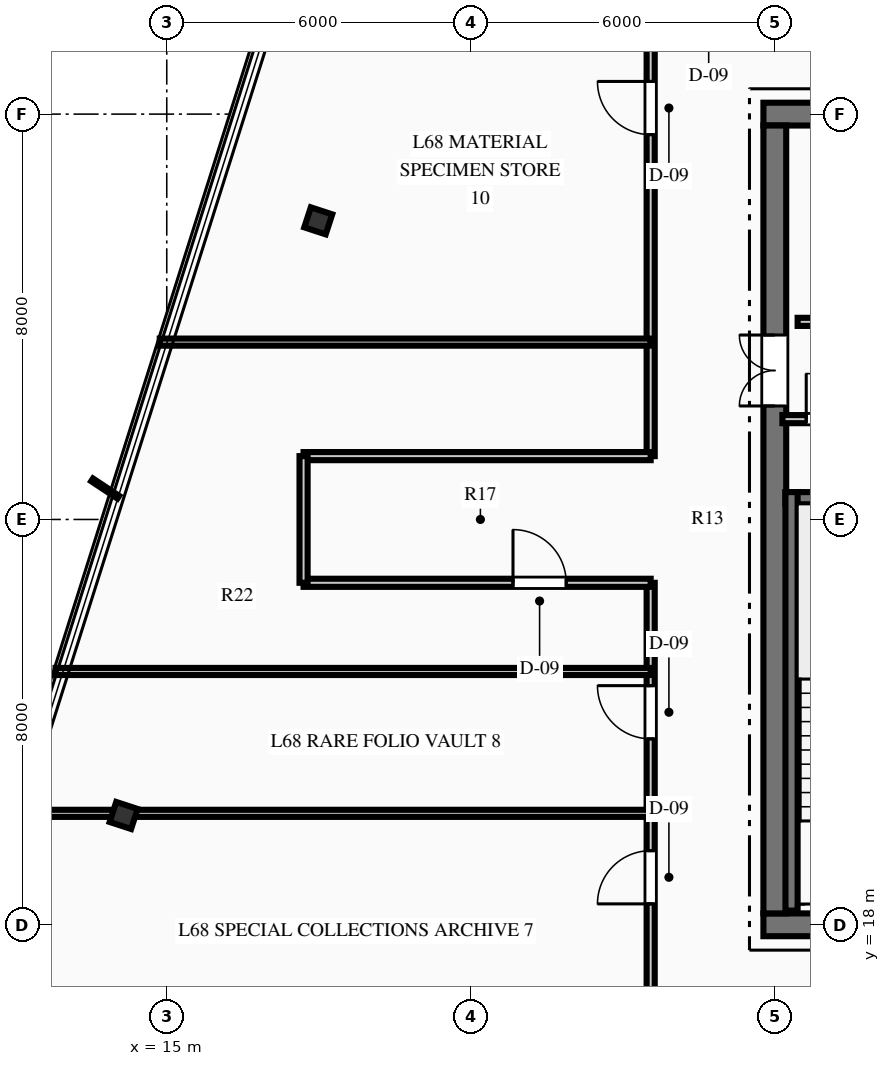
"""IFC4 building model, lengths in metres.
Left out: names, types, materials, properties, quantities, classifications, styles, units other than length and angle.
Written with IfcOpenShell. Run it as: python <this file> out.ifc"""

import sys

from ifc_helpers import new_model, si_unit, direction, frame, frame_2d, origin, origin_2d, place, context, subcontext, project, spatial, rectangle, i_section, extrude, element, fill, save


model = new_model("IFC4")
c1 = context("Model", 3, precision=1e-05, world=origin(), true_north=direction((0.0, 1.0)))
c2 = subcontext(c1, "Body", "Model", "MODEL_VIEW")
j1 = project(units=[si_unit("LENGTHUNIT", "METRE"), si_unit("PLANEANGLEUNIT", "RADIAN")], contexts=[c1])
p1 = place(None, origin())
s1 = spatial("IfcSite", under=j1, at=p1, CompositionType="ELEMENT")
p2 = place(p1, origin())
s2 = spatial("IfcBuilding", under=s1, at=p2, CompositionType="ELEMENT")
p3 = place(p2, frame((0.0, 0.0, 271.2)))
s3 = spatial("IfcBuildingStorey", under=s2, at=p3, CompositionType="ELEMENT", Elevation=271.2)
p4 = place(p3, frame((26.775, 18.0, 0.0), z_axis=(0.0, 0.0, 1.0), x_axis=(1.0, 0.0, 0.0)))
e1 = element("IfcWall", 1, at=p4, inside=s3, PredefinedType="SHEAR", context=c2, shape_type="SweptSolid", body=[
    extrude(rectangle(XDim=18.45, YDim=0.45, at=frame_2d((9.225, 0.0))), origin(), (0.0, 0.0, 1.0), 3.75),
])
p5 = place(p4, frame((7.325, 0.0, 0.0)))
e2 = element("IfcOpeningElement", 2, at=p5, cuts=e1, PredefinedType="OPENING", context=c2, shape_type="SweptSolid", body=[
    extrude(rectangle(XDim=1.1, YDim=2.15, at=frame_2d((0.55, 1.075))), frame((0.0, 0.235, 0.0), z_axis=(0.0, -1.0, 0.0), x_axis=(1.0, 0.0, 0.0)), (0.0, 0.0, 1.0), 0.47),
])
p6 = place(p4, frame((10.025, 0.0, 0.0)))
e3 = element("IfcOpeningElement", 3, at=p6, cuts=e1, PredefinedType="OPENING", context=c2, shape_type="SweptSolid", body=[
    extrude(rectangle(XDim=1.1, YDim=2.15, at=frame_2d((0.55, 1.075))), frame((0.0, 0.235, 0.0), z_axis=(0.0, -1.0, 0.0), x_axis=(1.0, 0.0, 0.0)), (0.0, 0.0, 1.0), 0.47),
])
p7 = place(p3, frame((26.775, 34.0, 0.0), z_axis=(0.0, 0.0, 1.0), x_axis=(1.0, 0.0, 0.0)))
e4 = element("IfcWall", 4, at=p7, inside=s3, PredefinedType="SHEAR", context=c2, shape_type="SweptSolid", body=[
    extrude(rectangle(XDim=18.45, YDim=0.45, at=frame_2d((9.225, 0.0))), origin(), (0.0, 0.0, 1.0), 3.75),
])
p8 = place(p3, frame((27.0, 18.225, 0.0), z_axis=(0.0, 0.0, 1.0), x_axis=(0.0, 1.0, 0.0)))
e5 = element("IfcWall", 5, at=p8, inside=s3, PredefinedType="SHEAR", context=c2, shape_type="SweptSolid", body=[
    extrude(rectangle(XDim=15.55, YDim=0.45, at=frame_2d((7.775, 0.0))), origin(), (0.0, 0.0, 1.0), 3.75),
])
p9 = place(p8, frame((10.015, 0.0, 0.0)))
e6 = element("IfcOpeningElement", 6, at=p9, cuts=e5, PredefinedType="OPENING", context=c2, shape_type="SweptSolid", body=[
    extrude(rectangle(XDim=1.4, YDim=2.2, at=frame_2d((0.7, 1.1))), frame((0.0, 0.235, 0.0), z_axis=(0.0, -1.0, 0.0), x_axis=(1.0, 0.0, 0.0)), (0.0, 0.0, 1.0), 0.47),
])
p10 = place(p3, frame((27.21, 26.42, 0.0), z_axis=(0.0, 0.0, 1.0), x_axis=(1.0, 0.0, 0.0)))
e7 = element("IfcWall", 7, at=p10, inside=s3, PredefinedType="SHEAR", context=c2, shape_type="SweptSolid", body=[
    extrude(rectangle(XDim=3.98, YDim=0.24, at=frame_2d((1.99, 0.0))), origin(), (0.0, 0.0, 1.0), 3.75),
])
p11 = place(p3, frame((27.33, 18.28, 0.0), z_axis=(0.0, 0.0, 1.0), x_axis=(0.0, 1.0, 0.0)))
e8 = element("IfcWall", 8, at=p11, inside=s3, PredefinedType="SHEAR", context=c2, shape_type="SweptSolid", body=[
    extrude(rectangle(XDim=8.26, YDim=0.24, at=frame_2d((4.13, 0.0))), origin(), (0.0, 0.0, 1.0), 3.75),
])
for number, where, z_axis, x_axis in (
    (9, (17.99, 31.894, 0.0), (0.0, 0.0, 1.0), (0.311, 0.95, 0.0)),
    (10, (14.149, 20.158, 0.0), (0.0, 0.0, 1.0), (0.311, 0.95, 0.0)),
):
    element("IfcColumn", number, at=place(p3, frame(where, z_axis=z_axis, x_axis=x_axis)), inside=s3, PredefinedType="COLUMN", context=c2, shape_type="SweptSolid", body=[
        extrude(i_section(OverallWidth=0.416, OverallDepth=0.445, WebThickness=0.039, FlangeThickness=0.063, at=origin_2d()), origin(), (0.0, 0.0, 1.0), 3.75),
    ])
p12 = place(p3, frame((27.15, 27.98, 0.0), z_axis=(0.0, 0.0, 1.0), x_axis=(1.0, 0.0, 0.0)))
e11 = element("IfcWall", 11, at=p12, inside=s3, PredefinedType="PARTITIONING", context=c2, shape_type="SweptSolid", body=[
    extrude(rectangle(XDim=4.05, YDim=0.16, at=frame_2d((2.025, 0.0))), origin(), (0.0, 0.0, 1.0), 3.48),
])
p13 = place(p12, frame((0.47, 0.0, 0.0)))
e12 = element("IfcOpeningElement", 12, at=p13, cuts=e11, PredefinedType="OPENING", context=c2, shape_type="SweptSolid", body=[
    extrude(rectangle(XDim=0.9, YDim=2.15, at=frame_2d((0.45, 1.075))), frame((0.0, 0.09, 0.0), z_axis=(0.0, -1.0, 0.0), x_axis=(1.0, 0.0, 0.0)), (0.0, 0.0, 1.0), 0.18),
])
p14 = place(p12, frame((2.36, 0.0, 0.0)))
e13 = element("IfcOpeningElement", 13, at=p14, cuts=e11, PredefinedType="OPENING", context=c2, shape_type="SweptSolid", body=[
    extrude(rectangle(XDim=0.9, YDim=2.15, at=frame_2d((0.45, 1.075))), frame((0.0, 0.09, 0.0), z_axis=(0.0, -1.0, 0.0), x_axis=(1.0, 0.0, 0.0)), (0.0, 0.0, 1.0), 0.18),
])
p15 = place(p3, frame((27.45, 29.9, 0.0), z_axis=(0.0, 0.0, 1.0), x_axis=(1.0, 0.0, 0.0)))
e14 = element("IfcWall", 14, at=p15, inside=s3, PredefinedType="PARTITIONING", context=c2, shape_type="SweptSolid", body=[
    extrude(rectangle(XDim=4.43, YDim=0.16, at=frame_2d((2.215, 0.0))), origin(), (0.0, 0.0, 1.0), 3.48),
])
p16 = place(p15, frame((0.6, 0.0, 0.0)))
e15 = element("IfcOpeningElement", 15, at=p16, cuts=e14, PredefinedType="OPENING", context=c2, shape_type="SweptSolid", body=[
    extrude(rectangle(XDim=0.9, YDim=2.15, at=frame_2d((0.45, 1.075))), frame((0.0, 0.09, 0.0), z_axis=(0.0, -1.0, 0.0), x_axis=(1.0, 0.0, 0.0)), (0.0, 0.0, 1.0), 0.18),
])
p17 = place(p15, frame((2.85, 0.0, 0.0)))
e16 = element("IfcOpeningElement", 16, at=p17, cuts=e14, PredefinedType="OPENING", context=c2, shape_type="SweptSolid", body=[
    extrude(rectangle(XDim=0.9, YDim=2.15, at=frame_2d((0.45, 1.075))), frame((0.0, 0.09, 0.0), z_axis=(0.0, -1.0, 0.0), x_axis=(1.0, 0.0, 0.0)), (0.0, 0.0, 1.0), 0.18),
])
p18 = place(p3, frame((24.55, 15.55, 0.0), z_axis=(0.0, 0.0, 1.0), x_axis=(0.0, 1.0, 0.0)))
e17 = element("IfcWall", 17, at=p18, inside=s3, PredefinedType="PARTITIONING", context=c2, shape_type="SweptSolid", body=[
    extrude(rectangle(XDim=9.2, YDim=0.16, at=frame_2d((4.6, 0.0))), origin(), (0.0, 0.0, 1.0), 3.48),
])
p19 = place(p18, frame((2.863, 0.0, 0.0)))
e18 = element("IfcOpeningElement", 18, at=p19, cuts=e17, PredefinedType="OPENING", context=c2, shape_type="SweptSolid", body=[
    extrude(rectangle(XDim=1.05, YDim=2.15, at=frame_2d((0.525, 1.075))), frame((0.0, 0.09, 0.0), z_axis=(0.0, -1.0, 0.0), x_axis=(1.0, 0.0, 0.0)), (0.0, 0.0, 1.0), 0.18),
])
p20 = place(p18, frame((6.12, 0.0, 0.0)))
e19 = element("IfcOpeningElement", 19, at=p20, cuts=e17, PredefinedType="OPENING", context=c2, shape_type="SweptSolid", body=[
    extrude(rectangle(XDim=1.05, YDim=2.15, at=frame_2d((0.525, 1.075))), frame((0.0, 0.09, 0.0), z_axis=(0.0, -1.0, 0.0), x_axis=(1.0, 0.0, 0.0)), (0.0, 0.0, 1.0), 0.18),
])
p21 = place(p3, frame((24.55, 27.25, 0.0), z_axis=(0.0, 0.0, 1.0), x_axis=(0.0, 1.0, 0.0)))
e20 = element("IfcWall", 20, at=p21, inside=s3, PredefinedType="PARTITIONING", context=c2, shape_type="SweptSolid", body=[
    extrude(rectangle(XDim=9.2, YDim=0.16, at=frame_2d((4.6, 0.0))), origin(), (0.0, 0.0, 1.0), 3.48),
])
p22 = place(p21, frame((6.345, 0.0, 0.0)))
e21 = element("IfcOpeningElement", 21, at=p22, cuts=e20, PredefinedType="OPENING", context=c2, shape_type="SweptSolid", body=[
    extrude(rectangle(XDim=1.05, YDim=2.15, at=frame_2d((0.525, 1.075))), frame((0.0, 0.09, 0.0), z_axis=(0.0, -1.0, 0.0), x_axis=(1.0, 0.0, 0.0)), (0.0, 0.0, 1.0), 0.18),
])
p23 = place(p3, frame((17.7, 24.75, 0.0), z_axis=(0.0, 0.0, 1.0), x_axis=(1.0, 0.0, 0.0)))
e22 = element("IfcWall", 22, at=p23, inside=s3, PredefinedType="PARTITIONING", context=c2, shape_type="SweptSolid", body=[
    extrude(rectangle(XDim=6.85, YDim=0.16, at=frame_2d((3.425, 0.0))), origin(), (0.0, 0.0, 1.0), 3.48),
])
p24 = place(p23, frame((4.133, 0.0, 0.0)))
e23 = element("IfcOpeningElement", 23, at=p24, cuts=e22, PredefinedType="OPENING", context=c2, shape_type="SweptSolid", body=[
    extrude(rectangle(XDim=1.05, YDim=2.15, at=frame_2d((0.525, 1.075))), frame((0.0, 0.09, 0.0), z_axis=(0.0, -1.0, 0.0), x_axis=(1.0, 0.0, 0.0)), (0.0, 0.0, 1.0), 0.18),
])
p25 = place(p3, frame((17.7, 27.25, 0.0), z_axis=(0.0, 0.0, 1.0), x_axis=(1.0, 0.0, 0.0)))
e24 = element("IfcWall", 24, at=p25, inside=s3, PredefinedType="PARTITIONING", context=c2, shape_type="SweptSolid", body=[
    extrude(rectangle(XDim=6.85, YDim=0.16, at=frame_2d((3.425, 0.0))), origin(), (0.0, 0.0, 1.0), 3.48),
])
p26 = place(p3, frame((17.7, 24.75, 0.0), z_axis=(0.0, 0.0, 1.0), x_axis=(0.0, 1.0, 0.0)))
e25 = element("IfcWall", 25, at=p26, inside=s3, PredefinedType="PARTITIONING", context=c2, shape_type="SweptSolid", body=[
    extrude(rectangle(XDim=2.5, YDim=0.16, at=frame_2d((1.25, 0.0))), origin(), (0.0, 0.0, 1.0), 3.48),
])
p27 = place(p3, frame((11.92, 20.2, 0.0), z_axis=(0.0, 0.0, 1.0), x_axis=(1.0, 0.0, 0.0)))
e26 = element("IfcWall", 26, at=p27, inside=s3, PredefinedType="PARTITIONING", context=c2, shape_type="SweptSolid", body=[
    extrude(rectangle(XDim=12.63, YDim=0.14, at=frame_2d((6.315, 0.0))), origin(), (0.0, 0.0, 1.0), 2.858),
])
p28 = place(p3, frame((12.806, 23.0, 0.0), z_axis=(0.0, 0.0, 1.0), x_axis=(1.0, 0.0, 0.0)))
e27 = element("IfcWall", 27, at=p28, inside=s3, PredefinedType="PARTITIONING", context=c2, shape_type="SweptSolid", body=[
    extrude(rectangle(XDim=11.744, YDim=0.14, at=frame_2d((5.872, 0.0))), origin(), (0.0, 0.0, 1.0), 3.48),
])
p29 = place(p3, frame((14.862, 29.5, 0.0), z_axis=(0.0, 0.0, 1.0), x_axis=(1.0, 0.0, 0.0)))
e28 = element("IfcWall", 28, at=p29, inside=s3, PredefinedType="PARTITIONING", context=c2, shape_type="SweptSolid", body=[
    extrude(rectangle(XDim=9.688, YDim=0.14, at=frame_2d((4.844, 0.0))), origin(), (0.0, 0.0, 1.0), 3.48),
])
p30 = place(p13, origin())
e29 = element("IfcDoor", 29, at=p30, inside=s3, OperationType="SINGLE_SWING_LEFT", PredefinedType="DOOR", context=c2, shape_type="SweptSolid", body=[
    extrude(rectangle(XDim=0.9, YDim=2.15, at=frame_2d((0.45, 1.075))), frame((0.0, 0.025, 0.0), z_axis=(0.0, -1.0, 0.0), x_axis=(1.0, 0.0, 0.0)), (0.0, 0.0, 1.0), 0.05),
])
fill(e12, e29)
p31 = place(p9, origin())
e30 = element("IfcDoor", 30, at=p31, inside=s3, OperationType="DOUBLE_DOOR_SINGLE_SWING", PredefinedType="DOOR", context=c2, shape_type="SweptSolid", body=[
    extrude(rectangle(XDim=1.4, YDim=2.2, at=frame_2d((0.7, 1.1))), frame((0.0, 0.025, 0.0), z_axis=(0.0, -1.0, 0.0), x_axis=(1.0, 0.0, 0.0)), (0.0, 0.0, 1.0), 0.05),
])
fill(e6, e30)
p32 = place(p19, origin())
e31 = element("IfcDoor", 31, at=p32, inside=s3, OperationType="SINGLE_SWING_LEFT", PredefinedType="DOOR", context=c2, shape_type="SweptSolid", body=[
    extrude(rectangle(XDim=1.05, YDim=2.15, at=frame_2d((0.525, 1.075))), frame((0.0, 0.025, 0.0), z_axis=(0.0, -1.0, 0.0), x_axis=(1.0, 0.0, 0.0)), (0.0, 0.0, 1.0), 0.05),
])
fill(e18, e31)
p33 = place(p20, origin())
e32 = element("IfcDoor", 32, at=p33, inside=s3, OperationType="SINGLE_SWING_RIGHT", PredefinedType="DOOR", context=c2, shape_type="SweptSolid", body=[
    extrude(rectangle(XDim=1.05, YDim=2.15, at=frame_2d((0.525, 1.075))), frame((0.0, 0.025, 0.0), z_axis=(0.0, -1.0, 0.0), x_axis=(1.0, 0.0, 0.0)), (0.0, 0.0, 1.0), 0.05),
])
fill(e19, e32)
p34 = place(p24, origin())
e33 = element("IfcDoor", 33, at=p34, inside=s3, OperationType="SINGLE_SWING_LEFT", PredefinedType="DOOR", context=c2, shape_type="SweptSolid", body=[
    extrude(rectangle(XDim=1.05, YDim=2.15, at=frame_2d((0.525, 1.075))), frame((0.0, 0.025, 0.0), z_axis=(0.0, -1.0, 0.0), x_axis=(1.0, 0.0, 0.0)), (0.0, 0.0, 1.0), 0.05),
])
fill(e23, e33)
p35 = place(p22, origin())
e34 = element("IfcDoor", 34, at=p35, inside=s3, OperationType="SINGLE_SWING_RIGHT", PredefinedType="DOOR", context=c2, shape_type="SweptSolid", body=[
    extrude(rectangle(XDim=1.05, YDim=2.15, at=frame_2d((0.525, 1.075))), frame((0.0, 0.025, 0.0), z_axis=(0.0, -1.0, 0.0), x_axis=(1.0, 0.0, 0.0)), (0.0, 0.0, 1.0), 0.05),
])
fill(e21, e34)
save(model, sys.argv[1])
